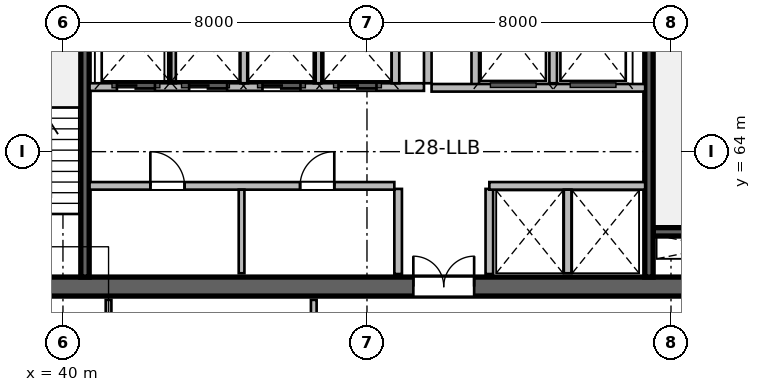
"""IFC4 building model, lengths in metres.
Left out: names, types, materials, properties, quantities, classifications, styles, units other than length and angle.
Written with IfcOpenShell. Run it as: python <this file> out.ifc"""

import sys

from ifc_helpers import new_model, si_unit, direction, frame, frame_2d, origin, place, context, subcontext, project, spatial, rectangle, extrude, source, transform, mapped, element, fill, save


model = new_model("IFC4")
c1 = context("Model", 3, precision=1e-05, world=origin(), true_north=direction((0.0, 1.0)))
c2 = subcontext(c1, "Body", "Model", "MODEL_VIEW")
j1 = project(units=[si_unit("LENGTHUNIT", "METRE"), si_unit("PLANEANGLEUNIT", "RADIAN")], contexts=[c1])
p1 = place(None, origin())
s1 = spatial("IfcSite", under=j1, at=p1, CompositionType="ELEMENT")
p2 = place(p1, origin())
s2 = spatial("IfcBuilding", under=s1, at=p2, CompositionType="ELEMENT")
p3 = place(p2, frame((0.0, 0.0, 119.4)))
s3 = spatial("IfcBuildingStorey", under=s2, at=p3, CompositionType="ELEMENT", Elevation=119.4)
m1 = source(origin(), c2, "Body", "SweptSolid", [
    extrude(rectangle(XDim=21.6, YDim=0.5, at=frame_2d((10.8, 0.0))), origin(), (0.0, 0.0, 1.0), 3.9),
])
p4 = place(p3, frame((37.2, 60.45, 0.0), z_axis=(0.0, 0.0, 1.0), x_axis=(1.0, 0.0, 0.0)))
e1 = element("IfcWall", 1, at=p4, inside=s3, PredefinedType="SHEAR", context=c2, shape_type="MappedRepresentation", body=[
    mapped(m1, transform((0.0, 0.0, 0.0), scale=1.0)),
])
p5 = place(p4, frame((1.1, 0.0, 0.0)))
e2 = element("IfcOpeningElement", 2, at=p5, cuts=e1, PredefinedType="OPENING", context=c2, shape_type="SweptSolid", body=[
    extrude(rectangle(XDim=1.15, YDim=2.15, at=frame_2d((0.575, 1.075))), frame((0.0, 0.26, 0.0), z_axis=(0.0, -1.0, 0.0), x_axis=(1.0, 0.0, 0.0)), (0.0, 0.0, 1.0), 0.52),
])
p6 = place(p4, frame((19.5, 0.0, 0.0)))
e3 = element("IfcOpeningElement", 3, at=p6, cuts=e1, PredefinedType="OPENING", context=c2, shape_type="SweptSolid", body=[
    extrude(rectangle(XDim=0.9, YDim=2.1, at=frame_2d((0.45, 1.05))), frame((0.0, 0.26, 0.0), z_axis=(0.0, -1.0, 0.0), x_axis=(1.0, 0.0, 0.0)), (0.0, 0.0, 1.0), 0.52),
])
p7 = place(p4, frame((12.02, 0.0, 0.0)))
e4 = element("IfcOpeningElement", 4, at=p7, cuts=e1, PredefinedType="OPENING", context=c2, shape_type="SweptSolid", body=[
    extrude(rectangle(XDim=1.6, YDim=2.15, at=frame_2d((0.8, 1.075))), frame((0.0, 0.26, 0.0), z_axis=(0.0, -1.0, 0.0), x_axis=(1.0, 0.0, 0.0)), (0.0, 0.0, 1.0), 0.52),
])
m2 = source(origin(), c2, "Body", "SweptSolid", [
    extrude(rectangle(XDim=3.27, YDim=0.22, at=frame_2d((1.635, 0.0))), origin(), (0.0, 0.0, 1.0), 3.9),
])
p8 = place(p3, frame((55.53, 61.89, 0.0), z_axis=(0.0, 0.0, 1.0), x_axis=(1.0, 0.0, 0.0)))
e5 = element("IfcWall", 5, at=p8, inside=s3, PredefinedType="SHEAR", context=c2, shape_type="MappedRepresentation", body=[
    mapped(m2, transform((0.0, 0.0, 0.0), scale=1.0)),
])
m3 = source(origin(), c2, "Body", "SweptSolid", [
    extrude(rectangle(XDim=11.0, YDim=0.22, at=frame_2d((5.5, 0.0))), origin(), (0.0, 0.0, 1.0), 3.9),
])
p9 = place(p3, frame((40.58, 60.7, 0.0), z_axis=(0.0, 0.0, 1.0), x_axis=(0.0, 1.0, 0.0)))
e6 = element("IfcWall", 6, at=p9, inside=s3, PredefinedType="SHEAR", context=c2, shape_type="MappedRepresentation", body=[
    mapped(m3, transform((0.0, 0.0, 0.0), scale=1.0)),
])
p10 = place(p3, frame((55.42, 60.7, 0.0), z_axis=(0.0, 0.0, 1.0), x_axis=(0.0, 1.0, 0.0)))
e7 = element("IfcWall", 7, at=p10, inside=s3, PredefinedType="SHEAR", context=c2, shape_type="MappedRepresentation", body=[
    mapped(m3, transform((0.0, 0.0, 0.0), scale=1.0)),
])
p11 = place(p10, frame((9.545, 0.0, 0.0)))
e8 = element("IfcOpeningElement", 8, at=p11, cuts=e7, PredefinedType="OPENING", context=c2, shape_type="SweptSolid", body=[
    extrude(rectangle(XDim=1.15, YDim=2.15, at=frame_2d((0.575, 1.075))), frame((0.0, 0.12, 0.0), z_axis=(0.0, -1.0, 0.0), x_axis=(1.0, 0.0, 0.0)), (0.0, 0.0, 1.0), 0.24),
])
m4 = source(origin(), c2, "Body", "SweptSolid", [
    extrude(rectangle(XDim=2.24, YDim=0.2, at=frame_2d((1.12, 0.0))), origin(), (0.0, 0.0, 1.0), 3.65),
])
for number, where, z_axis, x_axis in (
    (9, (48.82, 60.78, 0.0), (0.0, 0.0, 1.0), (0.0, 1.0, 0.0)),
    (10, (51.22, 60.78, 0.0), (0.0, 0.0, 1.0), (0.0, 1.0, 0.0)),
):
    element("IfcWall", number, at=place(p3, frame(where, z_axis=z_axis, x_axis=x_axis)), inside=s3, PredefinedType="SOLIDWALL", context=c2, shape_type="MappedRepresentation", body=[
        mapped(m4, transform((0.0, 0.0, 0.0), scale=1.0)),
    ])
m5 = source(origin(), c2, "Body", "SweptSolid", [
    extrude(rectangle(XDim=5.8, YDim=0.2, at=frame_2d((2.9, 0.0))), origin(), (0.0, 0.0, 1.0), 3.65),
])
p12 = place(p3, frame((49.6, 65.8, 0.0), z_axis=(0.0, 0.0, 1.0), x_axis=(0.0, 1.0, 0.0)))
e11 = element("IfcWall", 11, at=p12, inside=s3, PredefinedType="SOLIDWALL", context=c2, shape_type="MappedRepresentation", body=[
    mapped(m5, transform((0.0, 0.0, 0.0), scale=1.0)),
])
m6 = source(origin(), c2, "Body", "SweptSolid", [
    extrude(rectangle(XDim=2.58, YDim=0.2, at=frame_2d((1.29, 0.0))), origin(), (0.0, 0.0, 1.0), 3.65),
])
p13 = place(p3, frame((50.85, 65.68, 0.0), z_axis=(0.0, 0.0, 1.0), x_axis=(0.0, 1.0, 0.0)))
e12 = element("IfcWall", 12, at=p13, inside=s3, PredefinedType="SOLIDWALL", context=c2, shape_type="MappedRepresentation", body=[
    mapped(m6, transform((0.0, 0.0, 0.0), scale=1.0)),
])
m7 = source(origin(), c2, "Body", "SweptSolid", [
    extrude(rectangle(XDim=2.4, YDim=0.2, at=frame_2d((1.2, 0.0))), origin(), (0.0, 0.0, 1.0), 3.65),
])
p14 = place(p3, frame((52.9, 65.8, 0.0), z_axis=(0.0, 0.0, 1.0), x_axis=(0.0, 1.0, 0.0)))
e13 = element("IfcWall", 13, at=p14, inside=s3, PredefinedType="SOLIDWALL", context=c2, shape_type="MappedRepresentation", body=[
    mapped(m7, transform((0.0, 0.0, 0.0), scale=1.0)),
])
m8 = source(origin(), c2, "Body", "SweptSolid", [
    extrude(rectangle(XDim=5.62, YDim=0.2, at=frame_2d((2.81, 0.0))), origin(), (0.0, 0.0, 1.0), 3.65),
])
p15 = place(p3, frame((49.7, 65.68, 0.0), z_axis=(0.0, 0.0, 1.0), x_axis=(1.0, 0.0, 0.0)))
e14 = element("IfcWall", 14, at=p15, inside=s3, PredefinedType="SOLIDWALL", context=c2, shape_type="MappedRepresentation", body=[
    mapped(m8, transform((0.0, 0.0, 0.0), scale=1.0)),
])
m9 = source(origin(), c2, "Body", "SweptSolid", [
    extrude(rectangle(XDim=8.02, YDim=0.2, at=frame_2d((4.01, 0.0))), origin(), (0.0, 0.0, 1.0), 3.65),
])
p16 = place(p3, frame((40.7, 63.1, 0.0), z_axis=(0.0, 0.0, 1.0), x_axis=(1.0, 0.0, 0.0)))
e15 = element("IfcWall", 15, at=p16, inside=s3, PredefinedType="SOLIDWALL", context=c2, shape_type="MappedRepresentation", body=[
    mapped(m9, transform((0.0, 0.0, 0.0), scale=1.0)),
])
p17 = place(p16, frame((1.6, 0.0, 0.0)))
e16 = element("IfcOpeningElement", 16, at=p17, cuts=e15, PredefinedType="OPENING", context=c2, shape_type="SweptSolid", body=[
    extrude(rectangle(XDim=0.9, YDim=2.1, at=frame_2d((0.45, 1.05))), frame((0.0, 0.11, 0.0), z_axis=(0.0, -1.0, 0.0), x_axis=(1.0, 0.0, 0.0)), (0.0, 0.0, 1.0), 0.22),
])
p18 = place(p16, frame((5.54, 0.0, 0.0)))
e17 = element("IfcOpeningElement", 17, at=p18, cuts=e15, PredefinedType="OPENING", context=c2, shape_type="SweptSolid", body=[
    extrude(rectangle(XDim=0.9, YDim=2.1, at=frame_2d((0.45, 1.05))), frame((0.0, 0.11, 0.0), z_axis=(0.0, -1.0, 0.0), x_axis=(1.0, 0.0, 0.0)), (0.0, 0.0, 1.0), 0.22),
])
m10 = source(origin(), c2, "Body", "SweptSolid", [
    extrude(rectangle(XDim=4.1, YDim=0.2, at=frame_2d((2.05, 0.0))), origin(), (0.0, 0.0, 1.0), 3.65),
])
p19 = place(p3, frame((51.22, 63.1, 0.0), z_axis=(0.0, 0.0, 1.0), x_axis=(1.0, 0.0, 0.0)))
e18 = element("IfcWall", 18, at=p19, inside=s3, PredefinedType="SOLIDWALL", context=c2, shape_type="MappedRepresentation", body=[
    mapped(m10, transform((0.0, 0.0, 0.0), scale=1.0)),
])
m11 = source(origin(), c2, "Body", "SweptSolid", [
    extrude(rectangle(XDim=2.2, YDim=0.15, at=frame_2d((1.1, 0.0))), origin(), (0.0, 0.0, 1.0), 3.65),
])
p20 = place(p3, frame((44.7, 60.8, 0.0), z_axis=(0.0, 0.0, 1.0), x_axis=(0.0, 1.0, 0.0)))
e19 = element("IfcWall", 19, at=p20, inside=s3, PredefinedType="PARTITIONING", context=c2, shape_type="MappedRepresentation", body=[
    mapped(m11, transform((0.0, 0.0, 0.0), scale=1.0)),
])
m12 = source(origin(), c2, "Body", "SweptSolid", [
    extrude(rectangle(XDim=2.2, YDim=0.2, at=frame_2d((1.1, 0.0))), origin(), (0.0, 0.0, 1.0), 3.65),
])
p21 = place(p3, frame((53.28, 60.8, 0.0), z_axis=(0.0, 0.0, 1.0), x_axis=(0.0, 1.0, 0.0)))
e20 = element("IfcWall", 20, at=p21, inside=s3, PredefinedType="SOLIDWALL", context=c2, shape_type="MappedRepresentation", body=[
    mapped(m12, transform((0.0, 0.0, 0.0), scale=1.0)),
])
m13 = source(origin(), c2, "Body", "SweptSolid", [
    extrude(rectangle(XDim=8.8, YDim=0.2, at=frame_2d((4.4, 0.0))), origin(), (0.0, 0.0, 1.0), 3.65),
])
p22 = place(p3, frame((40.7, 65.7, 0.0), z_axis=(0.0, 0.0, 1.0), x_axis=(1.0, 0.0, 0.0)))
e21 = element("IfcWall", 21, at=p22, inside=s3, PredefinedType="SOLIDWALL", context=c2, shape_type="MappedRepresentation", body=[
    mapped(m13, transform((0.0, 0.0, 0.0), scale=1.0)),
])
p23 = place(p22, frame((0.72, 0.0, 0.0)))
e22 = element("IfcOpeningElement", 22, at=p23, cuts=e21, PredefinedType="OPENING", context=c2, shape_type="SweptSolid", body=[
    extrude(rectangle(XDim=1.0, YDim=2.15, at=frame_2d((0.5, 1.075))), frame((0.0, 0.11, 0.0), z_axis=(0.0, -1.0, 0.0), x_axis=(1.0, 0.0, 0.0)), (0.0, 0.0, 1.0), 0.22),
])
p24 = place(p22, frame((2.62, 0.0, 0.0)))
e23 = element("IfcOpeningElement", 23, at=p24, cuts=e21, PredefinedType="OPENING", context=c2, shape_type="SweptSolid", body=[
    extrude(rectangle(XDim=1.0, YDim=2.15, at=frame_2d((0.5, 1.075))), frame((0.0, 0.11, 0.0), z_axis=(0.0, -1.0, 0.0), x_axis=(1.0, 0.0, 0.0)), (0.0, 0.0, 1.0), 0.22),
])
p25 = place(p22, frame((4.55, 0.0, 0.0)))
e24 = element("IfcOpeningElement", 24, at=p25, cuts=e21, PredefinedType="OPENING", context=c2, shape_type="SweptSolid", body=[
    extrude(rectangle(XDim=1.0, YDim=2.15, at=frame_2d((0.5, 1.075))), frame((0.0, 0.11, 0.0), z_axis=(0.0, -1.0, 0.0), x_axis=(1.0, 0.0, 0.0)), (0.0, 0.0, 1.0), 0.22),
])
p26 = place(p22, frame((6.55, 0.0, 0.0)))
e25 = element("IfcOpeningElement", 25, at=p26, cuts=e21, PredefinedType="OPENING", context=c2, shape_type="SweptSolid", body=[
    extrude(rectangle(XDim=1.0, YDim=2.15, at=frame_2d((0.5, 1.075))), frame((0.0, 0.11, 0.0), z_axis=(0.0, -1.0, 0.0), x_axis=(1.0, 0.0, 0.0)), (0.0, 0.0, 1.0), 0.22),
])
for number, where, z_axis, x_axis in (
    (26, (48.75, 65.8, 0.0), (0.0, 0.0, 1.0), (0.0, 1.0, 0.0)),
    (27, (42.87, 65.8, 0.0), (0.0, 0.0, 1.0), (0.0, 1.0, 0.0)),
    (28, (44.77, 65.8, 0.0), (0.0, 0.0, 1.0), (0.0, 1.0, 0.0)),
    (29, (46.7, 65.8, 0.0), (0.0, 0.0, 1.0), (0.0, 1.0, 0.0)),
):
    element("IfcWall", number, at=place(p3, frame(where, z_axis=z_axis, x_axis=x_axis)), inside=s3, PredefinedType="SOLIDWALL", context=c2, shape_type="MappedRepresentation", body=[
        mapped(m7, transform((0.0, 0.0, 0.0), scale=1.0)),
    ])
m14 = source(origin(), c2, "Body", "SweptSolid", [
    extrude(rectangle(XDim=2.033, YDim=0.15, at=frame_2d((1.016, 0.0))), origin(), (0.0, 0.0, 1.0), 3.65),
])
p27 = place(p3, frame((41.2, 58.067, 0.0), z_axis=(0.0, 0.0, 1.0), x_axis=(0.0, 1.0, 0.0)))
e30 = element("IfcWall", 30, at=p27, inside=s3, PredefinedType="PARTITIONING", context=c2, shape_type="MappedRepresentation", body=[
    mapped(m14, transform((0.0, 0.0, 0.0), scale=1.0)),
])
p28 = place(p27, frame((0.591, 0.0, 0.0)))
e31 = element("IfcOpeningElement", 31, at=p28, cuts=e30, PredefinedType="OPENING", context=c2, shape_type="SweptSolid", body=[
    extrude(rectangle(XDim=0.85, YDim=2.1, at=frame_2d((0.425, 1.05))), frame((0.0, 0.085, 0.0), z_axis=(0.0, -1.0, 0.0), x_axis=(1.0, 0.0, 0.0)), (0.0, 0.0, 1.0), 0.17),
])
p29 = place(p3, frame((46.6, 58.067, 0.0), z_axis=(0.0, 0.0, 1.0), x_axis=(0.0, 1.0, 0.0)))
e32 = element("IfcWall", 32, at=p29, inside=s3, PredefinedType="PARTITIONING", context=c2, shape_type="MappedRepresentation", body=[
    mapped(m14, transform((0.0, 0.0, 0.0), scale=1.0)),
])
m15 = source(origin(), c2, "Body", "SweptSolid", [
    extrude(rectangle(XDim=1.6, YDim=2.15, at=frame_2d((0.8, 1.075))), frame((0.0, 0.025, 0.0), z_axis=(0.0, -1.0, 0.0), x_axis=(1.0, 0.0, 0.0)), (0.0, 0.0, 1.0), 0.05),
])
p30 = place(p7, origin())
e33 = element("IfcDoor", 33, at=p30, inside=s3, OperationType="DOUBLE_DOOR_SINGLE_SWING", PredefinedType="DOOR", context=c2, shape_type="MappedRepresentation", body=[
    mapped(m15, transform((0.0, 0.0, 0.0), scale=1.0)),
])
fill(e4, e33)
m16 = source(origin(), c2, "Body", "SweptSolid", [
    extrude(rectangle(XDim=0.9, YDim=2.1, at=frame_2d((0.45, 1.05))), frame((0.0, 0.025, 0.0), z_axis=(0.0, -1.0, 0.0), x_axis=(1.0, 0.0, 0.0)), (0.0, 0.0, 1.0), 0.05),
])
p31 = place(p17, origin())
e34 = element("IfcDoor", 34, at=p31, inside=s3, OperationType="SINGLE_SWING_LEFT", PredefinedType="DOOR", context=c2, shape_type="MappedRepresentation", body=[
    mapped(m16, transform((0.0, 0.0, 0.0), scale=1.0)),
])
fill(e16, e34)
p32 = place(p18, origin())
e35 = element("IfcDoor", 35, at=p32, inside=s3, OperationType="SINGLE_SWING_RIGHT", PredefinedType="DOOR", context=c2, shape_type="MappedRepresentation", body=[
    mapped(m16, transform((0.0, 0.0, 0.0), scale=1.0)),
])
fill(e17, e35)
m17 = source(origin(), c2, "Body", "SweptSolid", [
    extrude(rectangle(XDim=1.0, YDim=2.15, at=frame_2d((0.5, 1.075))), frame((0.0, 0.025, 0.0), z_axis=(0.0, -1.0, 0.0), x_axis=(1.0, 0.0, 0.0)), (0.0, 0.0, 1.0), 0.05),
])
p33 = place(p23, origin())
e36 = element("IfcDoor", 36, at=p33, inside=s3, OperationType="DOUBLE_DOOR_SLIDING", PredefinedType="DOOR", context=c2, shape_type="MappedRepresentation", body=[
    mapped(m17, transform((0.0, 0.0, 0.0), scale=1.0)),
])
fill(e22, e36)
p34 = place(p24, origin())
e37 = element("IfcDoor", 37, at=p34, inside=s3, OperationType="DOUBLE_DOOR_SLIDING", PredefinedType="DOOR", context=c2, shape_type="MappedRepresentation", body=[
    mapped(m17, transform((0.0, 0.0, 0.0), scale=1.0)),
])
fill(e23, e37)
p35 = place(p25, origin())
e38 = element("IfcDoor", 38, at=p35, inside=s3, OperationType="DOUBLE_DOOR_SLIDING", PredefinedType="DOOR", context=c2, shape_type="MappedRepresentation", body=[
    mapped(m17, transform((0.0, 0.0, 0.0), scale=1.0)),
])
fill(e24, e38)
p36 = place(p26, origin())
e39 = element("IfcDoor", 39, at=p36, inside=s3, OperationType="DOUBLE_DOOR_SLIDING", PredefinedType="DOOR", context=c2, shape_type="MappedRepresentation", body=[
    mapped(m17, transform((0.0, 0.0, 0.0), scale=1.0)),
])
fill(e25, e39)
save(model, sys.argv[1])
